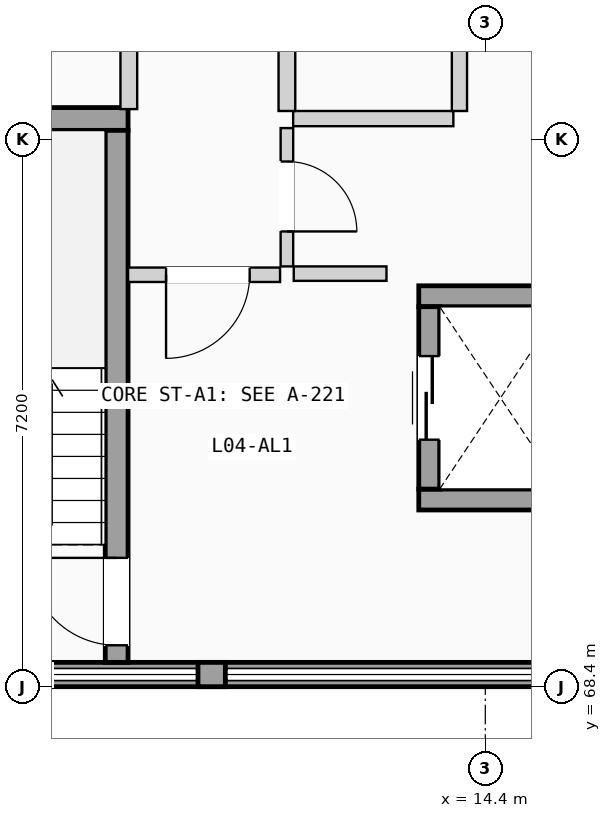
"""IFC4 building model, lengths in metres.
Left out: names, types, materials, properties, quantities, classifications, styles, units other than length and angle.
Written with IfcOpenShell. Run it as: python <this file> out.ifc"""

import sys

from ifc_helpers import new_model, si_unit, direction, frame, frame_2d, origin, place, context, subcontext, project, spatial, rectangle, extrude, element, fill, save


model = new_model("IFC4")
c1 = context("Model", 3, precision=1e-05, world=origin(), true_north=direction((0.0, 1.0)))
c2 = subcontext(c1, "Body", "Model", "MODEL_VIEW")
j1 = project(units=[si_unit("LENGTHUNIT", "METRE"), si_unit("PLANEANGLEUNIT", "RADIAN")], contexts=[c1])
p1 = place(None, origin())
s1 = spatial("IfcSite", under=j1, at=p1, CompositionType="ELEMENT")
p2 = place(p1, origin())
s2 = spatial("IfcBuilding", under=s1, at=p2, CompositionType="ELEMENT")
p3 = place(p2, frame((0.0, 0.0, 15.225)))
s3 = spatial("IfcBuildingStorey", under=s2, at=p3, CompositionType="ELEMENT", Elevation=15.225)
p4 = place(p3, frame((0.0, 68.56, 0.0), z_axis=(0.0, 0.0, 1.0), x_axis=(1.0, 0.0, 0.0)))
e1 = element("IfcWall", 1, at=p4, inside=s3, PredefinedType="SOLIDWALL", context=c2, shape_type="SweptSolid", body=[
    extrude(rectangle(XDim=21.6, YDim=0.32, at=frame_2d((10.8, 0.0))), origin(), (0.0, 0.0, 1.0), 1.11),
])
p5 = place(p3, frame((10.62, 68.56, 1.11), z_axis=(0.0, 0.0, 1.0), x_axis=(1.0, 0.0, 0.0)))
e2 = element("IfcWall", 2, at=p5, inside=s3, PredefinedType="SOLIDWALL", context=c2, shape_type="SweptSolid", body=[
    extrude(rectangle(XDim=0.36, YDim=0.32, at=frame_2d((0.18, 0.0))), origin(), (0.0, 0.0, 1.0), 1.78),
])
p6 = place(p3, frame((5.75, 75.87, 0.0), z_axis=(0.0, 0.0, 1.0), x_axis=(1.0, 0.0, 0.0)))
e3 = element("IfcWall", 3, at=p6, inside=s3, PredefinedType="SHEAR", context=c2, shape_type="SweptSolid", body=[
    extrude(rectangle(XDim=3.95, YDim=0.3, at=frame_2d((1.975, 0.0))), origin(), (0.0, 0.0, 1.0), 2.89),
])
p7 = place(p3, frame((9.55, 68.72, 0.0), z_axis=(0.0, 0.0, 1.0), x_axis=(0.0, 1.0, 0.0)))
e4 = element("IfcWall", 4, at=p7, inside=s3, PredefinedType="SHEAR", context=c2, shape_type="SweptSolid", body=[
    extrude(rectangle(XDim=7.0, YDim=0.3, at=frame_2d((3.5, 0.0))), origin(), (0.0, 0.0, 1.0), 2.89),
])
p8 = place(p7, frame((0.225, 0.0, 0.0)))
e5 = element("IfcOpeningElement", 5, at=p8, cuts=e4, PredefinedType="OPENING", context=c2, shape_type="SweptSolid", body=[
    extrude(rectangle(XDim=1.15, YDim=2.12, at=frame_2d((0.575, 1.06))), frame((0.0, 0.16, 0.0), z_axis=(0.0, -1.0, 0.0), x_axis=(1.0, 0.0, 0.0)), (0.0, 0.0, 1.0), 0.32),
])
for number, where, z_axis, x_axis in (
    (6, (13.525, 70.863, 0.0), (0.0, 0.0, 1.0), (1.0, 0.0, 0.0)),
    (7, (13.525, 73.538, 0.0), (0.0, 0.0, 1.0), (1.0, 0.0, 0.0)),
):
    element("IfcWall", number, at=place(p3, frame(where, z_axis=z_axis, x_axis=x_axis)), inside=s3, PredefinedType="SHEAR", context=c2, shape_type="SweptSolid", body=[
        extrude(rectangle(XDim=2.15, YDim=0.275, at=frame_2d((1.075, 0.0))), origin(), (0.0, 0.0, 1.0), 2.89),
    ])
p9 = place(p3, frame((13.663, 71.0, 0.0), z_axis=(0.0, 0.0, 1.0), x_axis=(0.0, 1.0, 0.0)))
e8 = element("IfcWall", 8, at=p9, inside=s3, PredefinedType="SHEAR", context=c2, shape_type="SweptSolid", body=[
    extrude(rectangle(XDim=2.4, YDim=0.275, at=frame_2d((1.2, 0.0))), origin(), (0.0, 0.0, 1.0), 2.89),
])
p10 = place(p9, frame((0.65, 0.0, 0.0)))
e9 = element("IfcOpeningElement", 9, at=p10, cuts=e8, PredefinedType="OPENING", context=c2, shape_type="SweptSolid", body=[
    extrude(rectangle(XDim=1.1, YDim=2.15, at=frame_2d((0.55, 1.075))), frame((0.0, 0.147, 0.0), z_axis=(0.0, -1.0, 0.0), x_axis=(1.0, 0.0, 0.0)), (0.0, 0.0, 1.0), 0.295),
])
p11 = place(p3, frame((11.88, 73.835, 0.0), z_axis=(0.0, 0.0, 1.0), x_axis=(1.0, 0.0, 0.0)))
e10 = element("IfcWall", 10, at=p11, inside=s3, PredefinedType="PARTITIONING", context=c2, shape_type="SweptSolid", body=[
    extrude(rectangle(XDim=1.22, YDim=0.19, at=frame_2d((0.61, 0.0))), origin(), (0.0, 0.0, 1.0), 2.87),
])
p12 = place(p3, frame((9.7, 73.82, 0.0), z_axis=(0.0, 0.0, 1.0), x_axis=(1.0, 0.0, 0.0)))
e11 = element("IfcWall", 11, at=p12, inside=s3, PredefinedType="PARTITIONING", context=c2, shape_type="SweptSolid", body=[
    extrude(rectangle(XDim=2.0, YDim=0.19, at=frame_2d((1.0, 0.0))), origin(), (0.0, 0.0, 1.0), 2.87),
])
p13 = place(p12, frame((0.5, 0.0, 0.0)))
e12 = element("IfcOpeningElement", 12, at=p13, cuts=e11, PredefinedType="OPENING", context=c2, shape_type="SweptSolid", body=[
    extrude(rectangle(XDim=1.1, YDim=2.12, at=frame_2d((0.55, 1.06))), frame((0.0, 0.105, 0.0), z_axis=(0.0, -1.0, 0.0), x_axis=(1.0, 0.0, 0.0)), (0.0, 0.0, 1.0), 0.21),
])
p14 = place(p3, frame((11.79, 73.93, 0.0), z_axis=(0.0, 0.0, 1.0), x_axis=(0.0, 1.0, 0.0)))
e13 = element("IfcWall", 13, at=p14, inside=s3, PredefinedType="PARTITIONING", context=c2, shape_type="SweptSolid", body=[
    extrude(rectangle(XDim=1.82, YDim=0.165, at=frame_2d((0.91, 0.0))), origin(), (0.0, 0.0, 1.0), 2.87),
])
p15 = place(p14, frame((0.46, 0.0, 0.0)))
e14 = element("IfcOpeningElement", 14, at=p15, cuts=e13, PredefinedType="OPENING", context=c2, shape_type="SweptSolid", body=[
    extrude(rectangle(XDim=0.92, YDim=2.04, at=frame_2d((0.46, 1.02))), frame((0.0, 0.093, 0.0), z_axis=(0.0, -1.0, 0.0), x_axis=(1.0, 0.0, 0.0)), (0.0, 0.0, 1.0), 0.185),
])
p16 = place(p3, frame((11.872, 75.875, 0.0), z_axis=(0.0, 0.0, 1.0), x_axis=(1.0, 0.0, 0.0)))
e15 = element("IfcWall", 15, at=p16, inside=s3, PredefinedType="PLUMBINGWALL", context=c2, shape_type="SweptSolid", body=[
    extrude(rectangle(XDim=2.108, YDim=0.2, at=frame_2d((1.054, 0.0))), origin(), (0.0, 0.0, 1.0), 2.87),
])
p17 = place(p3, frame((9.71, 76.0, 0.0), z_axis=(0.0, 0.0, 1.0), x_axis=(0.0, 1.0, 0.0)))
e16 = element("IfcWall", 16, at=p17, inside=s3, PredefinedType="PLUMBINGWALL", context=c2, shape_type="SweptSolid", body=[
    extrude(rectangle(XDim=7.67, YDim=0.22, at=frame_2d((3.835, 0.0))), origin(), (0.0, 0.0, 1.0), 2.87),
])
p18 = place(p3, frame((11.79, 75.975, 0.0), z_axis=(0.0, 0.0, 1.0), x_axis=(0.0, 1.0, 0.0)))
e17 = element("IfcWall", 17, at=p18, inside=s3, PredefinedType="PLUMBINGWALL", context=c2, shape_type="SweptSolid", body=[
    extrude(rectangle(XDim=7.695, YDim=0.22, at=frame_2d((3.847, 0.0))), origin(), (0.0, 0.0, 1.0), 2.87),
])
p19 = place(p3, frame((14.06, 75.975, 0.0), z_axis=(0.0, 0.0, 1.0), x_axis=(0.0, 1.0, 0.0)))
e18 = element("IfcWall", 18, at=p19, inside=s3, PredefinedType="PLUMBINGWALL", context=c2, shape_type="SweptSolid", body=[
    extrude(rectangle(XDim=7.715, YDim=0.2, at=frame_2d((3.857, 0.0))), origin(), (0.0, 0.0, 1.0), 2.87),
])
p20 = place(p19, frame((3.435, 0.0, 0.0)))
e19 = element("IfcOpeningElement", 19, at=p20, cuts=e18, PredefinedType="OPENING", context=c2, shape_type="SweptSolid", body=[
    extrude(rectangle(XDim=0.85, YDim=2.01, at=frame_2d((0.425, 1.005))), frame((0.0, 0.11, 0.0), z_axis=(0.0, -1.0, 0.0), x_axis=(1.0, 0.0, 0.0)), (0.0, 0.0, 1.0), 0.22),
])
p21 = place(p8, origin())
e20 = element("IfcDoor", 20, at=p21, inside=s3, OperationType="SINGLE_SWING_RIGHT", PredefinedType="DOOR", context=c2, shape_type="SweptSolid", body=[
    extrude(rectangle(XDim=1.15, YDim=2.12, at=frame_2d((0.575, 1.06))), frame((0.0, 0.025, 0.0), z_axis=(0.0, -1.0, 0.0), x_axis=(1.0, 0.0, 0.0)), (0.0, 0.0, 1.0), 0.05),
])
fill(e5, e20)
p22 = place(p10, origin())
e21 = element("IfcDoor", 21, at=p22, inside=s3, OperationType="SLIDING_TO_LEFT", PredefinedType="DOOR", context=c2, shape_type="SweptSolid", body=[
    extrude(rectangle(XDim=1.1, YDim=2.15, at=frame_2d((0.55, 1.075))), frame((0.0, 0.025, 0.0), z_axis=(0.0, -1.0, 0.0), x_axis=(1.0, 0.0, 0.0)), (0.0, 0.0, 1.0), 0.05),
])
fill(e9, e21)
p23 = place(p13, frame((1.1, 0.0, 0.0), z_axis=(0.0, 0.0, 1.0), x_axis=(-1.0, 0.0, 0.0)))
e22 = element("IfcDoor", 22, at=p23, inside=s3, OperationType="SINGLE_SWING_LEFT", PredefinedType="DOOR", context=c2, shape_type="SweptSolid", body=[
    extrude(rectangle(XDim=1.1, YDim=2.12, at=frame_2d((0.55, 1.06))), frame((0.0, 0.025, 0.0), z_axis=(0.0, -1.0, 0.0), x_axis=(1.0, 0.0, 0.0)), (0.0, 0.0, 1.0), 0.05),
])
fill(e12, e22)
p24 = place(p15, frame((0.92, 0.0, 0.0), z_axis=(0.0, 0.0, 1.0), x_axis=(-1.0, 0.0, 0.0)))
e23 = element("IfcDoor", 23, at=p24, inside=s3, OperationType="SINGLE_SWING_LEFT", PredefinedType="DOOR", context=c2, shape_type="SweptSolid", body=[
    extrude(rectangle(XDim=0.92, YDim=2.04, at=frame_2d((0.46, 1.02))), frame((0.0, 0.025, 0.0), z_axis=(0.0, -1.0, 0.0), x_axis=(1.0, 0.0, 0.0)), (0.0, 0.0, 1.0), 0.05),
])
fill(e14, e23)
save(model, sys.argv[1])
